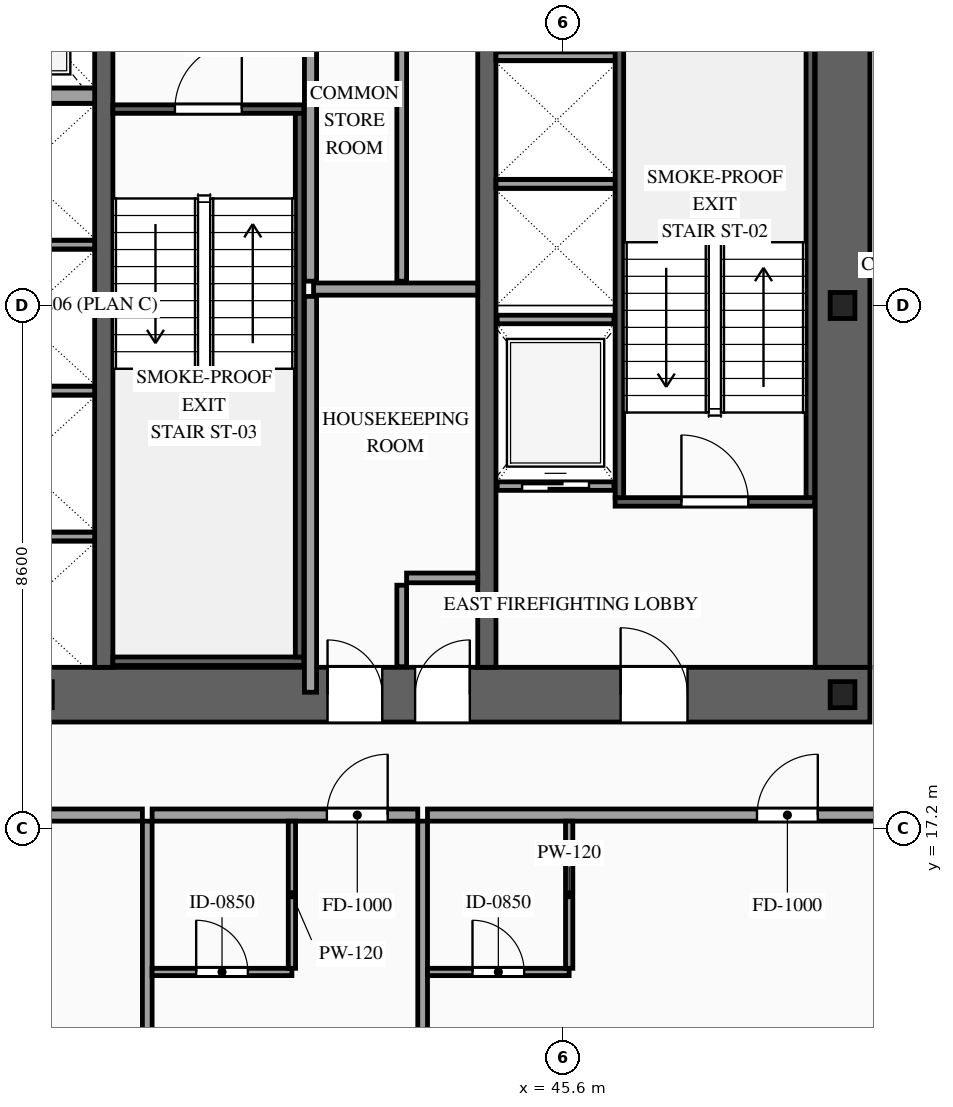
"""IFC4 building model, lengths in metres.
Left out: names, types, materials, properties, quantities, classifications, styles, units other than length and angle.
Written with IfcOpenShell. Run it as: python <this file> out.ifc"""

import sys

from ifc_helpers import new_model, si_unit, direction, frame, frame_2d, origin, origin_2d, place, context, subcontext, project, spatial, rectangle, i_section, extrude, source, transform, mapped, element, fill, save


model = new_model("IFC4")
c1 = context("Model", 3, precision=1e-05, world=origin(), true_north=direction((0.0, 1.0)))
c2 = subcontext(c1, "Body", "Model", "MODEL_VIEW")
j1 = project(units=[si_unit("LENGTHUNIT", "METRE"), si_unit("PLANEANGLEUNIT", "RADIAN")], contexts=[c1])
p1 = place(None, origin())
s1 = spatial("IfcSite", under=j1, at=p1, CompositionType="ELEMENT")
p2 = place(p1, origin())
s2 = spatial("IfcBuilding", under=s1, at=p2, CompositionType="ELEMENT")
p3 = place(p2, frame((0.0, 0.0, 74.8)))
s3 = spatial("IfcBuildingStorey", under=s2, at=p3, CompositionType="ELEMENT", Elevation=74.8)
p4 = place(p3, frame((23.35, 19.4, 0.0), z_axis=(0.0, 0.0, 1.0), x_axis=(1.0, 0.0, 0.0)))
e1 = element("IfcWall", 1, at=p4, inside=s3, PredefinedType="SHEAR", context=c2, shape_type="SweptSolid", body=[
    extrude(rectangle(XDim=27.3, YDim=0.9, at=frame_2d((13.65, 0.0))), origin(), (0.0, 0.0, 1.0), 3.6),
])
p5 = place(p4, frame((2.1, 0.0, 0.0)))
e2 = element("IfcOpeningElement", 2, at=p5, cuts=e1, PredefinedType="OPENING", context=c2, shape_type="SweptSolid", body=[
    extrude(rectangle(XDim=1.1, YDim=2.2, at=frame_2d((0.55, 1.1))), frame((0.0, 0.465, 0.0), z_axis=(0.0, -1.0, 0.0), x_axis=(1.0, 0.0, 0.0)), (0.0, 0.0, 1.0), 0.93),
])
p6 = place(p4, frame((10.0, 0.0, 0.0)))
e3 = element("IfcOpeningElement", 3, at=p6, cuts=e1, PredefinedType="OPENING", context=c2, shape_type="SweptSolid", body=[
    extrude(rectangle(XDim=1.1, YDim=2.2, at=frame_2d((0.55, 1.1))), frame((0.0, 0.465, 0.0), z_axis=(0.0, -1.0, 0.0), x_axis=(1.0, 0.0, 0.0)), (0.0, 0.0, 1.0), 0.93),
])
p7 = place(p4, frame((23.2, 0.0, 0.0)))
e4 = element("IfcOpeningElement", 4, at=p7, cuts=e1, PredefinedType="OPENING", context=c2, shape_type="SweptSolid", body=[
    extrude(rectangle(XDim=1.1, YDim=2.2, at=frame_2d((0.55, 1.1))), frame((0.0, 0.465, 0.0), z_axis=(0.0, -1.0, 0.0), x_axis=(1.0, 0.0, 0.0)), (0.0, 0.0, 1.0), 0.93),
])
p8 = place(p4, frame((19.82, 0.0, 0.0)))
e5 = element("IfcOpeningElement", 5, at=p8, cuts=e1, PredefinedType="OPENING", context=c2, shape_type="SweptSolid", body=[
    extrude(rectangle(XDim=0.9, YDim=2.15, at=frame_2d((0.45, 1.075))), frame((0.0, 0.465, 0.0), z_axis=(0.0, -1.0, 0.0), x_axis=(1.0, 0.0, 0.0)), (0.0, 0.0, 1.0), 0.93),
])
p9 = place(p4, frame((18.38, 0.0, 0.0)))
e6 = element("IfcOpeningElement", 6, at=p9, cuts=e1, PredefinedType="OPENING", context=c2, shape_type="SweptSolid", body=[
    extrude(rectangle(XDim=0.9, YDim=2.15, at=frame_2d((0.45, 1.075))), frame((0.0, 0.465, 0.0), z_axis=(0.0, -1.0, 0.0), x_axis=(1.0, 0.0, 0.0)), (0.0, 0.0, 1.0), 0.93),
])
m1 = source(origin(), c2, "Body", "SweptSolid", [
    extrude(rectangle(XDim=11.9, YDim=0.9, at=frame_2d((5.95, 0.0))), origin(), (0.0, 0.0, 1.0), 3.6),
])
p10 = place(p3, frame((50.2, 19.85, 0.0), z_axis=(0.0, 0.0, 1.0), x_axis=(0.0, 1.0, 0.0)))
e7 = element("IfcWall", 7, at=p10, inside=s3, PredefinedType="SHEAR", context=c2, shape_type="MappedRepresentation", body=[
    mapped(m1, transform((0.0, 0.0, 0.0), scale=1.0)),
])
m2 = source(origin(), c2, "Body", "SweptSolid", [
    extrude(rectangle(XDim=11.9, YDim=0.3, at=frame_2d((5.95, 0.0))), origin(), (0.0, 0.0, 1.0), 3.6),
])
for number, where, z_axis, x_axis in (
    (8, (38.05, 19.85, 0.0), (0.0, 0.0, 1.0), (0.0, 1.0, 0.0)),
    (9, (44.35, 19.85, 0.0), (0.0, 0.0, 1.0), (0.0, 1.0, 0.0)),
):
    element("IfcWall", number, at=place(p3, frame(where, z_axis=z_axis, x_axis=x_axis)), inside=s3, PredefinedType="SOLIDWALL", context=c2, shape_type="MappedRepresentation", body=[
        mapped(m2, transform((0.0, 0.0, 0.0), scale=1.0)),
    ])
m3 = source(origin(), c2, "Body", "SweptSolid", [
    extrude(i_section(OverallWidth=0.407, OverallDepth=0.428, WebThickness=0.02, FlangeThickness=0.035, at=origin_2d()), origin(), (0.0, 0.0, 1.0), 3.6),
])
for number, where, z_axis, x_axis in (
    (10, (37.0, 19.4, 0.0), (0.0, 0.0, 1.0), (1.0, 0.0, 0.0)),
    (11, (50.2, 19.4, 0.0), (0.0, 0.0, 1.0), (1.0, 0.0, 0.0)),
    (12, (50.2, 25.8, 0.0), (0.0, 0.0, 1.0), (1.0, 0.0, 0.0)),
):
    element("IfcColumn", number, at=place(p3, frame(where, z_axis=z_axis, x_axis=x_axis)), inside=s3, PredefinedType="COLUMN", context=c2, shape_type="MappedRepresentation", body=[
        mapped(m3, transform((0.0, 0.0, 0.0), scale=1.0)),
    ])
p11 = place(p3, frame((44.52, 22.83, 0.0), z_axis=(0.0, 0.0, 1.0), x_axis=(1.0, 0.0, 0.0)))
e13 = element("IfcWall", 13, at=p11, inside=s3, PredefinedType="SOLIDWALL", context=c2, shape_type="SweptSolid", body=[
    extrude(rectangle(XDim=1.92, YDim=0.14, at=frame_2d((0.96, 0.0))), origin(), (0.0, 0.0, 1.0), 3.38),
])
p12 = place(p11, frame((0.41, 0.0, 0.0)))
e14 = element("IfcOpeningElement", 14, at=p12, cuts=e13, PredefinedType="OPENING", context=c2, shape_type="SweptSolid", body=[
    extrude(rectangle(XDim=1.1, YDim=2.2, at=frame_2d((0.55, 1.1))), frame((0.0, 0.085, 0.0), z_axis=(0.0, -1.0, 0.0), x_axis=(1.0, 0.0, 0.0)), (0.0, 0.0, 1.0), 0.17),
])
m4 = source(origin(), c2, "Body", "SweptSolid", [
    extrude(rectangle(XDim=1.92, YDim=0.14, at=frame_2d((0.96, 0.0))), origin(), (0.0, 0.0, 1.0), 3.38),
])
p13 = place(p3, frame((44.52, 25.57, 0.0), z_axis=(0.0, 0.0, 1.0), x_axis=(1.0, 0.0, 0.0)))
e15 = element("IfcWall", 15, at=p13, inside=s3, PredefinedType="SOLIDWALL", context=c2, shape_type="MappedRepresentation", body=[
    mapped(m4, transform((0.0, 0.0, 0.0), scale=1.0)),
])
m5 = source(origin(), c2, "Body", "SweptSolid", [
    extrude(rectangle(XDim=2.4, YDim=0.14, at=frame_2d((1.2, 0.0))), origin(), (0.0, 0.0, 1.0), 3.38),
])
for number, where, z_axis, x_axis in (
    (16, (35.5, 22.0, 0.0), (0.0, 0.0, 1.0), (1.0, 0.0, 0.0)),
    (17, (35.5, 24.4, 0.0), (0.0, 0.0, 1.0), (1.0, 0.0, 0.0)),
    (18, (35.5, 26.8, 0.0), (0.0, 0.0, 1.0), (1.0, 0.0, 0.0)),
):
    element("IfcWall", number, at=place(p3, frame(where, z_axis=z_axis, x_axis=x_axis)), inside=s3, PredefinedType="SOLIDWALL", context=c2, shape_type="MappedRepresentation", body=[
        mapped(m5, transform((0.0, 0.0, 0.0), scale=1.0)),
    ])
m6 = source(origin(), c2, "Body", "SweptSolid", [
    extrude(rectangle(XDim=2.4, YDim=0.25, at=frame_2d((1.2, 0.0))), origin(), (0.0, 0.0, 1.0), 3.38),
])
p14 = place(p3, frame((35.5, 29.25, 0.0), z_axis=(0.0, 0.0, 1.0), x_axis=(1.0, 0.0, 0.0)))
e19 = element("IfcWall", 19, at=p14, inside=s3, PredefinedType="SOLIDWALL", context=c2, shape_type="MappedRepresentation", body=[
    mapped(m6, transform((0.0, 0.0, 0.0), scale=1.0)),
])
m7 = source(origin(), c2, "Body", "SweptSolid", [
    extrude(rectangle(XDim=2.0, YDim=0.14, at=frame_2d((1.0, 0.0))), origin(), (0.0, 0.0, 1.0), 3.38),
])
for number, where, z_axis, x_axis in (
    (20, (44.5, 27.8, 0.0), (0.0, 0.0, 1.0), (1.0, 0.0, 0.0)),
    (21, (44.5, 29.9, 0.0), (0.0, 0.0, 1.0), (1.0, 0.0, 0.0)),
):
    element("IfcWall", number, at=place(p3, frame(where, z_axis=z_axis, x_axis=x_axis)), inside=s3, PredefinedType="SOLIDWALL", context=c2, shape_type="MappedRepresentation", body=[
        mapped(m7, transform((0.0, 0.0, 0.0), scale=1.0)),
    ])
p15 = place(p3, frame((46.46, 22.57, 0.0), z_axis=(0.0, 0.0, 1.0), x_axis=(1.0, 0.0, 0.0)))
e22 = element("IfcWall", 22, at=p15, inside=s3, PredefinedType="SOLIDWALL", context=c2, shape_type="SweptSolid", body=[
    extrude(rectangle(XDim=3.28, YDim=0.14, at=frame_2d((1.64, 0.0))), origin(), (0.0, 0.0, 1.0), 3.38),
])
p16 = place(p15, frame((1.09, 0.0, 0.0)))
e23 = element("IfcOpeningElement", 23, at=p16, cuts=e22, PredefinedType="OPENING", context=c2, shape_type="SweptSolid", body=[
    extrude(rectangle(XDim=1.1, YDim=2.2, at=frame_2d((0.55, 1.1))), frame((0.0, 0.085, 0.0), z_axis=(0.0, -1.0, 0.0), x_axis=(1.0, 0.0, 0.0)), (0.0, 0.0, 1.0), 0.17),
])
m8 = source(origin(), c2, "Body", "SweptSolid", [
    extrude(rectangle(XDim=8.94, YDim=0.14, at=frame_2d((4.47, 0.0))), origin(), (0.0, 0.0, 1.0), 3.38),
])
for number, where, z_axis, x_axis in (
    (24, (46.53, 22.64, 0.0), (0.0, 0.0, 1.0), (0.0, 1.0, 0.0)),
    (25, (49.67, 22.64, 0.0), (0.0, 0.0, 1.0), (0.0, 1.0, 0.0)),
):
    element("IfcWall", number, at=place(p3, frame(where, z_axis=z_axis, x_axis=x_axis)), inside=s3, PredefinedType="SOLIDWALL", context=c2, shape_type="MappedRepresentation", body=[
        mapped(m8, transform((0.0, 0.0, 0.0), scale=1.0)),
    ])
p17 = place(p3, frame((38.2, 29.03, 0.0), z_axis=(0.0, 0.0, 1.0), x_axis=(1.0, 0.0, 0.0)))
e26 = element("IfcWall", 26, at=p17, inside=s3, PredefinedType="SOLIDWALL", context=c2, shape_type="SweptSolid", body=[
    extrude(rectangle(XDim=3.14, YDim=0.14, at=frame_2d((1.57, 0.0))), origin(), (0.0, 0.0, 1.0), 3.38),
])
p18 = place(p17, frame((1.02, 0.0, 0.0)))
e27 = element("IfcOpeningElement", 27, at=p18, cuts=e26, PredefinedType="OPENING", context=c2, shape_type="SweptSolid", body=[
    extrude(rectangle(XDim=1.1, YDim=2.2, at=frame_2d((0.55, 1.1))), frame((0.0, 0.085, 0.0), z_axis=(0.0, -1.0, 0.0), x_axis=(1.0, 0.0, 0.0)), (0.0, 0.0, 1.0), 0.17),
])
m9 = source(origin(), c2, "Body", "SweptSolid", [
    extrude(rectangle(XDim=3.14, YDim=0.14, at=frame_2d((1.57, 0.0))), origin(), (0.0, 0.0, 1.0), 3.38),
])
p19 = place(p3, frame((38.2, 19.95, 0.0), z_axis=(0.0, 0.0, 1.0), x_axis=(1.0, 0.0, 0.0)))
e28 = element("IfcWall", 28, at=p19, inside=s3, PredefinedType="SOLIDWALL", context=c2, shape_type="MappedRepresentation", body=[
    mapped(m9, transform((0.0, 0.0, 0.0), scale=1.0)),
])
m10 = source(origin(), c2, "Body", "SweptSolid", [
    extrude(rectangle(XDim=8.94, YDim=0.14, at=frame_2d((4.47, 0.0))), origin(), (0.0, 0.0, 1.0), 3.38),
])
p20 = place(p3, frame((41.27, 20.02, 0.0), z_axis=(0.0, 0.0, 1.0), x_axis=(0.0, 1.0, 0.0)))
e29 = element("IfcWall", 29, at=p20, inside=s3, PredefinedType="SOLIDWALL", context=c2, shape_type="MappedRepresentation", body=[
    mapped(m10, transform((0.0, 0.0, 0.0), scale=1.0)),
])
m11 = source(origin(), c2, "Body", "SweptSolid", [
    extrude(rectangle(XDim=1.34, YDim=0.16, at=frame_2d((0.67, 0.0))), origin(), (0.0, 0.0, 1.0), 3.38),
])
p21 = place(p3, frame((42.95, 19.86, 0.0), z_axis=(0.0, 0.0, 1.0), x_axis=(0.0, 1.0, 0.0)))
e30 = element("IfcWall", 30, at=p21, inside=s3, PredefinedType="PARTITIONING", context=c2, shape_type="MappedRepresentation", body=[
    mapped(m11, transform((0.0, 0.0, 0.0), scale=1.0)),
])
m12 = source(origin(), c2, "Body", "SweptSolid", [
    extrude(rectangle(XDim=1.17, YDim=0.16, at=frame_2d((0.585, 0.0))), origin(), (0.0, 0.0, 1.0), 3.38),
])
p22 = place(p3, frame((43.03, 21.32, 0.0), z_axis=(0.0, 0.0, 1.0), x_axis=(1.0, 0.0, 0.0)))
e31 = element("IfcWall", 31, at=p22, inside=s3, PredefinedType="PARTITIONING", context=c2, shape_type="MappedRepresentation", body=[
    mapped(m12, transform((0.0, 0.0, 0.0), scale=1.0)),
])
m13 = source(origin(), c2, "Body", "SweptSolid", [
    extrude(rectangle(XDim=6.51, YDim=0.2, at=frame_2d((3.255, 0.0))), origin(), (0.0, 0.0, 1.0), 3.38),
])
p23 = place(p3, frame((41.45, 19.44, 0.0), z_axis=(0.0, 0.0, 1.0), x_axis=(0.0, 1.0, 0.0)))
e32 = element("IfcWall", 32, at=p23, inside=s3, PredefinedType="PARTITIONING", context=c2, shape_type="MappedRepresentation", body=[
    mapped(m13, transform((0.0, 0.0, 0.0), scale=1.0)),
])
m14 = source(origin(), c2, "Body", "SweptSolid", [
    extrude(rectangle(XDim=2.7, YDim=0.2, at=frame_2d((1.35, 0.0))), origin(), (0.0, 0.0, 1.0), 3.38),
])
p24 = place(p3, frame((41.5, 26.07, 0.0), z_axis=(0.0, 0.0, 1.0), x_axis=(1.0, 0.0, 0.0)))
e33 = element("IfcWall", 33, at=p24, inside=s3, PredefinedType="PARTITIONING", context=c2, shape_type="MappedRepresentation", body=[
    mapped(m14, transform((0.0, 0.0, 0.0), scale=1.0)),
])
m15 = source(origin(), c2, "Body", "SweptSolid", [
    extrude(rectangle(XDim=5.96, YDim=0.2, at=frame_2d((2.98, 0.0))), origin(), (0.0, 0.0, 1.0), 3.38),
])
p25 = place(p3, frame((41.45, 26.2, 0.0), z_axis=(0.0, 0.0, 1.0), x_axis=(0.0, 1.0, 0.0)))
e34 = element("IfcWall", 34, at=p25, inside=s3, PredefinedType="PARTITIONING", context=c2, shape_type="MappedRepresentation", body=[
    mapped(m15, transform((0.0, 0.0, 0.0), scale=1.0)),
])
m16 = source(origin(), c2, "Body", "SweptSolid", [
    extrude(rectangle(XDim=5.96, YDim=0.16, at=frame_2d((2.98, 0.0))), origin(), (0.0, 0.0, 1.0), 3.38),
])
p26 = place(p3, frame((42.95, 26.2, 0.0), z_axis=(0.0, 0.0, 1.0), x_axis=(0.0, 1.0, 0.0)))
e35 = element("IfcWall", 35, at=p26, inside=s3, PredefinedType="PARTITIONING", context=c2, shape_type="MappedRepresentation", body=[
    mapped(m16, transform((0.0, 0.0, 0.0), scale=1.0)),
])
p27 = place(p3, frame((28.668, 17.42, 0.0), z_axis=(0.0, 0.0, 1.0), x_axis=(1.0, 0.0, 0.0)))
e36 = element("IfcWall", 36, at=p27, inside=s3, PredefinedType="PARTITIONING", context=c2, shape_type="SweptSolid", body=[
    extrude(rectangle(XDim=10.017, YDim=0.2, at=frame_2d((5.009, 0.0))), origin(), (0.0, 0.0, 1.0), 3.38),
])
p28 = place(p27, frame((5.714, 0.0, 0.0)))
e37 = element("IfcOpeningElement", 37, at=p28, cuts=e36, PredefinedType="OPENING", context=c2, shape_type="SweptSolid", body=[
    extrude(rectangle(XDim=1.0, YDim=2.2, at=frame_2d((0.5, 1.1))), frame((0.0, 0.115, 0.0), z_axis=(0.0, -1.0, 0.0), x_axis=(1.0, 0.0, 0.0)), (0.0, 0.0, 1.0), 0.23),
])
m17 = source(origin(), c2, "Body", "SweptSolid", [
    extrude(rectangle(XDim=16.47, YDim=0.16, at=frame_2d((8.235, 0.0))), origin(), (0.0, 0.0, 1.0), 3.38),
])
p29 = place(p3, frame((38.765, 0.85, 0.0), z_axis=(0.0, 0.0, 1.0), x_axis=(0.0, 1.0, 0.0)))
e38 = element("IfcWall", 38, at=p29, inside=s3, PredefinedType="PARTITIONING", context=c2, shape_type="MappedRepresentation", body=[
    mapped(m17, transform((0.0, 0.0, 0.0), scale=1.0)),
])
p30 = place(p3, frame((38.845, 17.42, 0.0), z_axis=(0.0, 0.0, 1.0), x_axis=(1.0, 0.0, 0.0)))
e39 = element("IfcWall", 39, at=p30, inside=s3, PredefinedType="PARTITIONING", context=c2, shape_type="SweptSolid", body=[
    extrude(rectangle(XDim=4.369, YDim=0.2, at=frame_2d((2.185, 0.0))), origin(), (0.0, 0.0, 1.0), 3.38),
])
p31 = place(p30, frame((2.874, 0.0, 0.0)))
e40 = element("IfcOpeningElement", 40, at=p31, cuts=e39, PredefinedType="OPENING", context=c2, shape_type="SweptSolid", body=[
    extrude(rectangle(XDim=1.0, YDim=2.2, at=frame_2d((0.5, 1.1))), frame((0.0, 0.115, 0.0), z_axis=(0.0, -1.0, 0.0), x_axis=(1.0, 0.0, 0.0)), (0.0, 0.0, 1.0), 0.23),
])
p32 = place(p3, frame((43.294, 0.85, 0.0), z_axis=(0.0, 0.0, 1.0), x_axis=(0.0, 1.0, 0.0)))
e41 = element("IfcWall", 41, at=p32, inside=s3, PredefinedType="PARTITIONING", context=c2, shape_type="MappedRepresentation", body=[
    mapped(m17, transform((0.0, 0.0, 0.0), scale=1.0)),
])
p33 = place(p3, frame((38.845, 14.84, 0.0), z_axis=(0.0, 0.0, 1.0), x_axis=(1.0, 0.0, 0.0)))
e42 = element("IfcWall", 42, at=p33, inside=s3, PredefinedType="PARTITIONING", context=c2, shape_type="SweptSolid", body=[
    extrude(rectangle(XDim=2.299, YDim=0.12, at=frame_2d((1.149, 0.0))), origin(), (0.0, 0.0, 1.0), 3.38),
])
p34 = place(p33, frame((0.725, 0.0, 0.0)))
e43 = element("IfcOpeningElement", 43, at=p34, cuts=e42, PredefinedType="OPENING", context=c2, shape_type="SweptSolid", body=[
    extrude(rectangle(XDim=0.85, YDim=2.1, at=frame_2d((0.425, 1.05))), frame((0.0, 0.075, 0.0), z_axis=(0.0, -1.0, 0.0), x_axis=(1.0, 0.0, 0.0)), (0.0, 0.0, 1.0), 0.15),
])
m18 = source(origin(), c2, "Body", "SweptSolid", [
    extrude(rectangle(XDim=2.42, YDim=0.12, at=frame_2d((1.21, 0.0))), origin(), (0.0, 0.0, 1.0), 3.38),
])
p35 = place(p3, frame((41.144, 14.9, 0.0), z_axis=(0.0, 0.0, 1.0), x_axis=(0.0, 1.0, 0.0)))
e44 = element("IfcWall", 44, at=p35, inside=s3, PredefinedType="PARTITIONING", context=c2, shape_type="MappedRepresentation", body=[
    mapped(m18, transform((0.0, 0.0, 0.0), scale=1.0)),
])
p36 = place(p3, frame((43.374, 17.42, 0.0), z_axis=(0.0, 0.0, 1.0), x_axis=(1.0, 0.0, 0.0)))
e45 = element("IfcWall", 45, at=p36, inside=s3, PredefinedType="PARTITIONING", context=c2, shape_type="SweptSolid", body=[
    extrude(rectangle(XDim=9.429, YDim=0.2, at=frame_2d((4.714, 0.0))), origin(), (0.0, 0.0, 1.0), 3.38),
])
p37 = place(p36, frame((5.419, 0.0, 0.0)))
e46 = element("IfcOpeningElement", 46, at=p37, cuts=e45, PredefinedType="OPENING", context=c2, shape_type="SweptSolid", body=[
    extrude(rectangle(XDim=1.0, YDim=2.2, at=frame_2d((0.5, 1.1))), frame((0.0, 0.115, 0.0), z_axis=(0.0, -1.0, 0.0), x_axis=(1.0, 0.0, 0.0)), (0.0, 0.0, 1.0), 0.23),
])
p38 = place(p3, frame((43.374, 14.84, 0.0), z_axis=(0.0, 0.0, 1.0), x_axis=(1.0, 0.0, 0.0)))
e47 = element("IfcWall", 47, at=p38, inside=s3, PredefinedType="PARTITIONING", context=c2, shape_type="SweptSolid", body=[
    extrude(rectangle(XDim=2.33, YDim=0.12, at=frame_2d((1.165, 0.0))), origin(), (0.0, 0.0, 1.0), 3.38),
])
p39 = place(p38, frame((0.74, 0.0, 0.0)))
e48 = element("IfcOpeningElement", 48, at=p39, cuts=e47, PredefinedType="OPENING", context=c2, shape_type="SweptSolid", body=[
    extrude(rectangle(XDim=0.85, YDim=2.1, at=frame_2d((0.425, 1.05))), frame((0.0, 0.075, 0.0), z_axis=(0.0, -1.0, 0.0), x_axis=(1.0, 0.0, 0.0)), (0.0, 0.0, 1.0), 0.15),
])
p40 = place(p3, frame((45.704, 14.9, 0.0), z_axis=(0.0, 0.0, 1.0), x_axis=(0.0, 1.0, 0.0)))
e49 = element("IfcWall", 49, at=p40, inside=s3, PredefinedType="PARTITIONING", context=c2, shape_type="MappedRepresentation", body=[
    mapped(m18, transform((0.0, 0.0, 0.0), scale=1.0)),
])
m19 = source(origin(), c2, "Body", "SweptSolid", [
    extrude(rectangle(XDim=1.1, YDim=2.2, at=frame_2d((0.55, 1.1))), frame((0.0, 0.025, 0.0), z_axis=(0.0, -1.0, 0.0), x_axis=(1.0, 0.0, 0.0)), (0.0, 0.0, 1.0), 0.05),
])
p41 = place(p12, origin())
e50 = element("IfcDoor", 50, at=p41, inside=s3, OperationType="SLIDING_TO_RIGHT", PredefinedType="DOOR", context=c2, shape_type="MappedRepresentation", body=[
    mapped(m19, transform((0.0, 0.0, 0.0), scale=1.0)),
])
fill(e14, e50)
m20 = source(origin(), c2, "Body", "SweptSolid", [
    extrude(rectangle(XDim=1.1, YDim=2.2, at=frame_2d((0.55, 1.1))), frame((0.0, 0.025, 0.0), z_axis=(0.0, -1.0, 0.0), x_axis=(1.0, 0.0, 0.0)), (0.0, 0.0, 1.0), 0.05),
])
p42 = place(p16, origin())
e51 = element("IfcDoor", 51, at=p42, inside=s3, OperationType="SINGLE_SWING_LEFT", PredefinedType="DOOR", context=c2, shape_type="MappedRepresentation", body=[
    mapped(m20, transform((0.0, 0.0, 0.0), scale=1.0)),
])
fill(e23, e51)
p43 = place(p18, origin())
e52 = element("IfcDoor", 52, at=p43, inside=s3, OperationType="SINGLE_SWING_RIGHT", PredefinedType="DOOR", context=c2, shape_type="MappedRepresentation", body=[
    mapped(m20, transform((0.0, 0.0, 0.0), scale=1.0)),
])
fill(e27, e52)
p44 = place(p7, origin())
e53 = element("IfcDoor", 53, at=p44, inside=s3, OperationType="SINGLE_SWING_LEFT", PredefinedType="DOOR", context=c2, shape_type="MappedRepresentation", body=[
    mapped(m20, transform((0.0, 0.0, 0.0), scale=1.0)),
])
fill(e4, e53)
m21 = source(origin(), c2, "Body", "SweptSolid", [
    extrude(rectangle(XDim=0.9, YDim=2.15, at=frame_2d((0.45, 1.075))), frame((0.0, 0.025, 0.0), z_axis=(0.0, -1.0, 0.0), x_axis=(1.0, 0.0, 0.0)), (0.0, 0.0, 1.0), 0.05),
])
p45 = place(p8, origin())
e54 = element("IfcDoor", 54, at=p45, inside=s3, OperationType="SINGLE_SWING_RIGHT", PredefinedType="DOOR", context=c2, shape_type="MappedRepresentation", body=[
    mapped(m21, transform((0.0, 0.0, 0.0), scale=1.0)),
])
fill(e5, e54)
p46 = place(p9, origin())
e55 = element("IfcDoor", 55, at=p46, inside=s3, OperationType="SINGLE_SWING_LEFT", PredefinedType="DOOR", context=c2, shape_type="MappedRepresentation", body=[
    mapped(m21, transform((0.0, 0.0, 0.0), scale=1.0)),
])
fill(e6, e55)
m22 = source(origin(), c2, "Body", "SweptSolid", [
    extrude(rectangle(XDim=1.0, YDim=2.2, at=frame_2d((0.5, 1.1))), frame((0.0, 0.025, 0.0), z_axis=(0.0, -1.0, 0.0), x_axis=(1.0, 0.0, 0.0)), (0.0, 0.0, 1.0), 0.05),
])
p47 = place(p31, origin())
e56 = element("IfcDoor", 56, at=p47, inside=s3, OperationType="SINGLE_SWING_RIGHT", PredefinedType="DOOR", context=c2, shape_type="MappedRepresentation", body=[
    mapped(m22, transform((0.0, 0.0, 0.0), scale=1.0)),
])
fill(e40, e56)
m23 = source(origin(), c2, "Body", "SweptSolid", [
    extrude(rectangle(XDim=0.85, YDim=2.1, at=frame_2d((0.425, 1.05))), frame((0.0, 0.025, 0.0), z_axis=(0.0, -1.0, 0.0), x_axis=(1.0, 0.0, 0.0)), (0.0, 0.0, 1.0), 0.05),
])
p48 = place(p34, origin())
e57 = element("IfcDoor", 57, at=p48, inside=s3, OperationType="SINGLE_SWING_LEFT", PredefinedType="DOOR", context=c2, shape_type="MappedRepresentation", body=[
    mapped(m23, transform((0.0, 0.0, 0.0), scale=1.0)),
])
fill(e43, e57)
p49 = place(p37, origin())
e58 = element("IfcDoor", 58, at=p49, inside=s3, OperationType="SINGLE_SWING_RIGHT", PredefinedType="DOOR", context=c2, shape_type="MappedRepresentation", body=[
    mapped(m22, transform((0.0, 0.0, 0.0), scale=1.0)),
])
fill(e46, e58)
p50 = place(p39, origin())
e59 = element("IfcDoor", 59, at=p50, inside=s3, OperationType="SINGLE_SWING_LEFT", PredefinedType="DOOR", context=c2, shape_type="MappedRepresentation", body=[
    mapped(m23, transform((0.0, 0.0, 0.0), scale=1.0)),
])
fill(e48, e59)
save(model, sys.argv[1])
